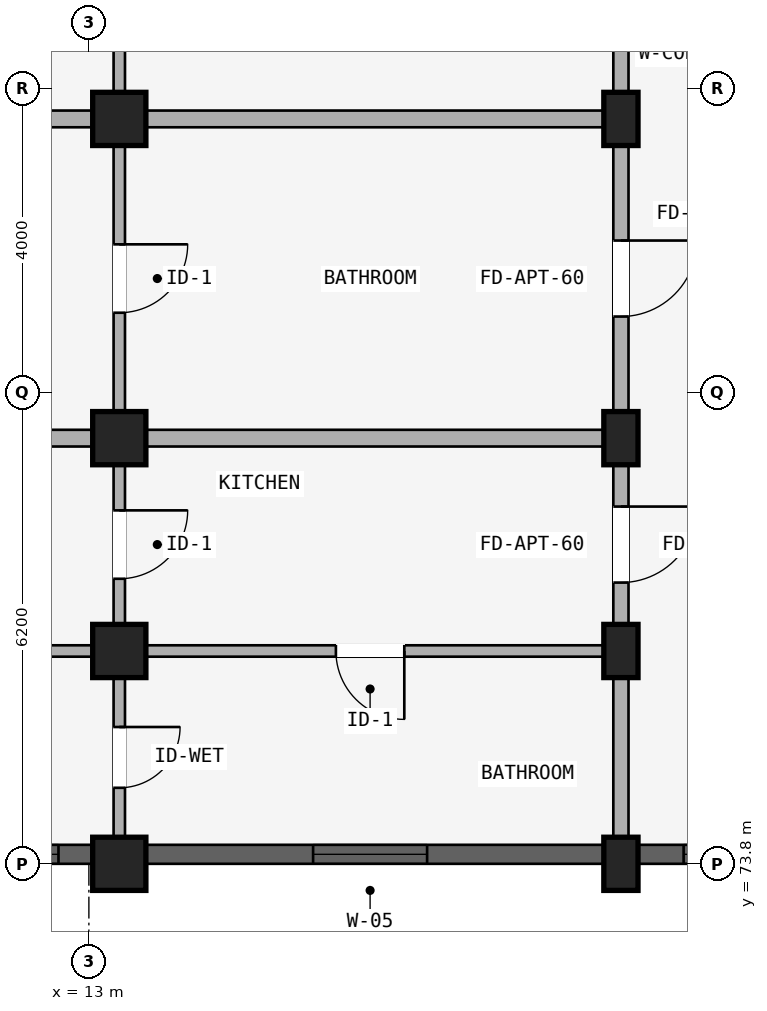
"""IFC4 building model, lengths in metres.
Left out: names, types, materials, properties, quantities, classifications, styles, units other than length and angle.
Written with IfcOpenShell. Run it as: python <this file> out.ifc"""

import sys

from ifc_helpers import new_model, si_unit, direction, frame, frame_2d, origin, origin_2d, place, context, subcontext, project, spatial, rectangle, extrude, element, fill, save


model = new_model("IFC4")
c1 = context("Model", 3, precision=1e-05, world=origin(), true_north=direction((0.0, 1.0)))
c2 = subcontext(c1, "Body", "Model", "MODEL_VIEW")
j1 = project(units=[si_unit("LENGTHUNIT", "METRE"), si_unit("PLANEANGLEUNIT", "RADIAN")], contexts=[c1])
p1 = place(None, origin())
s1 = spatial("IfcSite", under=j1, at=p1, CompositionType="ELEMENT")
p2 = place(p1, origin())
s2 = spatial("IfcBuilding", under=s1, at=p2, CompositionType="ELEMENT")
p3 = place(p2, frame((0.0, 0.0, 21.3)))
s3 = spatial("IfcBuildingStorey", under=s2, at=p3, CompositionType="ELEMENT", Elevation=21.3)
p4 = place(p3, frame((20.0, 83.6, 0.0), z_axis=(0.0, 0.0, 1.0), x_axis=(1.0, 0.0, 0.0)))
e1 = element("IfcColumn", 1, at=p4, inside=s3, PredefinedType="COLUMN", context=c2, shape_type="SweptSolid", body=[
    extrude(rectangle(XDim=0.45, YDim=0.7, at=origin_2d()), origin(), (0.0, 0.0, 1.0), 2.93),
])
p5 = place(p3, frame((13.4, 83.6, 0.0), z_axis=(0.0, 0.0, 1.0), x_axis=(1.0, 0.0, 0.0)))
e2 = element("IfcColumn", 2, at=p5, inside=s3, PredefinedType="COLUMN", context=c2, shape_type="SweptSolid", body=[
    extrude(rectangle(XDim=0.7, YDim=0.7, at=origin_2d()), origin(), (0.0, 0.0, 1.0), 2.93),
])
p6 = place(p3, frame((20.0, 79.4, 0.0), z_axis=(0.0, 0.0, 1.0), x_axis=(1.0, 0.0, 0.0)))
e3 = element("IfcColumn", 3, at=p6, inside=s3, PredefinedType="COLUMN", context=c2, shape_type="SweptSolid", body=[
    extrude(rectangle(XDim=0.45, YDim=0.7, at=origin_2d()), origin(), (0.0, 0.0, 1.0), 2.93),
])
p7 = place(p3, frame((13.4, 79.4, 0.0), z_axis=(0.0, 0.0, 1.0), x_axis=(1.0, 0.0, 0.0)))
e4 = element("IfcColumn", 4, at=p7, inside=s3, PredefinedType="COLUMN", context=c2, shape_type="SweptSolid", body=[
    extrude(rectangle(XDim=0.7, YDim=0.7, at=origin_2d()), origin(), (0.0, 0.0, 1.0), 2.93),
])
p8 = place(p3, frame((20.0, 76.6, 0.0), z_axis=(0.0, 0.0, 1.0), x_axis=(1.0, 0.0, 0.0)))
e5 = element("IfcColumn", 5, at=p8, inside=s3, PredefinedType="COLUMN", context=c2, shape_type="SweptSolid", body=[
    extrude(rectangle(XDim=0.45, YDim=0.7, at=origin_2d()), origin(), (0.0, 0.0, 1.0), 2.93),
])
p9 = place(p3, frame((13.4, 76.6, 0.0), z_axis=(0.0, 0.0, 1.0), x_axis=(1.0, 0.0, 0.0)))
e6 = element("IfcColumn", 6, at=p9, inside=s3, PredefinedType="COLUMN", context=c2, shape_type="SweptSolid", body=[
    extrude(rectangle(XDim=0.7, YDim=0.7, at=origin_2d()), origin(), (0.0, 0.0, 1.0), 2.93),
])
p10 = place(p3, frame((20.0, 73.8, 0.0), z_axis=(0.0, 0.0, 1.0), x_axis=(1.0, 0.0, 0.0)))
e7 = element("IfcColumn", 7, at=p10, inside=s3, PredefinedType="COLUMN", context=c2, shape_type="SweptSolid", body=[
    extrude(rectangle(XDim=0.45, YDim=0.7, at=origin_2d()), origin(), (0.0, 0.0, 1.0), 2.93),
])
p11 = place(p3, frame((13.4, 73.8, 0.0), z_axis=(0.0, 0.0, 1.0), x_axis=(1.0, 0.0, 0.0)))
e8 = element("IfcColumn", 8, at=p11, inside=s3, PredefinedType="COLUMN", context=c2, shape_type="SweptSolid", body=[
    extrude(rectangle(XDim=0.7, YDim=0.7, at=origin_2d()), origin(), (0.0, 0.0, 1.0), 2.93),
])
p12 = place(p3, frame((20.0, 87.65, 0.0), z_axis=(0.0, 0.0, 1.0), x_axis=(0.0, -1.0, 0.0)))
e9 = element("IfcWall", 9, at=p12, inside=s3, PredefinedType="STANDARD", context=c2, shape_type="SweptSolid", body=[
    extrude(rectangle(XDim=4.05, YDim=0.2, at=frame_2d((2.025, 0.0))), origin(), (0.0, 0.0, 1.0), 2.372),
])
p13 = place(p12, frame((1.525, 0.0, 0.0)))
e10 = element("IfcOpeningElement", 10, at=p13, cuts=e9, PredefinedType="OPENING", context=c2, shape_type="SweptSolid", body=[
    extrude(rectangle(XDim=1.0, YDim=2.15, at=frame_2d((0.5, 1.075))), frame((0.0, 0.11, 0.0), z_axis=(0.0, -1.0, 0.0), x_axis=(1.0, 0.0, 0.0)), (0.0, 0.0, 1.0), 0.22),
])
p14 = place(p3, frame((13.4, 87.57, 0.0), z_axis=(0.0, 0.0, 1.0), x_axis=(0.0, -1.0, 0.0)))
e11 = element("IfcWall", 11, at=p14, inside=s3, PredefinedType="PARTITIONING", context=c2, shape_type="SweptSolid", body=[
    extrude(rectangle(XDim=3.89, YDim=0.15, at=frame_2d((1.945, 0.0))), origin(), (0.0, 0.0, 1.0), 2.372),
])
p15 = place(p14, frame((1.495, 0.0, 0.0)))
e12 = element("IfcOpeningElement", 12, at=p15, cuts=e11, PredefinedType="OPENING", context=c2, shape_type="SweptSolid", body=[
    extrude(rectangle(XDim=0.9, YDim=2.1, at=frame_2d((0.45, 1.05))), frame((0.0, 0.085, 0.0), z_axis=(0.0, -1.0, 0.0), x_axis=(1.0, 0.0, 0.0)), (0.0, 0.0, 1.0), 0.17),
])
p16 = place(p3, frame((20.0, 83.6, 0.0), z_axis=(0.0, 0.0, 1.0), x_axis=(0.0, -1.0, 0.0)))
e13 = element("IfcWall", 13, at=p16, inside=s3, PredefinedType="STANDARD", context=c2, shape_type="SweptSolid", body=[
    extrude(rectangle(XDim=4.2, YDim=0.2, at=frame_2d((2.1, 0.0))), origin(), (0.0, 0.0, 1.0), 2.372),
])
p17 = place(p16, frame((1.6, 0.0, 0.0)))
e14 = element("IfcOpeningElement", 14, at=p17, cuts=e13, PredefinedType="OPENING", context=c2, shape_type="SweptSolid", body=[
    extrude(rectangle(XDim=1.0, YDim=2.15, at=frame_2d((0.5, 1.075))), frame((0.0, 0.11, 0.0), z_axis=(0.0, -1.0, 0.0), x_axis=(1.0, 0.0, 0.0)), (0.0, 0.0, 1.0), 0.22),
])
p18 = place(p3, frame((13.4, 83.52, 0.0), z_axis=(0.0, 0.0, 1.0), x_axis=(0.0, -1.0, 0.0)))
e15 = element("IfcWall", 15, at=p18, inside=s3, PredefinedType="PARTITIONING", context=c2, shape_type="SweptSolid", body=[
    extrude(rectangle(XDim=4.04, YDim=0.15, at=frame_2d((2.02, 0.0))), origin(), (0.0, 0.0, 1.0), 2.372),
])
p19 = place(p18, frame((1.57, 0.0, 0.0)))
e16 = element("IfcOpeningElement", 16, at=p19, cuts=e15, PredefinedType="OPENING", context=c2, shape_type="SweptSolid", body=[
    extrude(rectangle(XDim=0.9, YDim=2.1, at=frame_2d((0.45, 1.05))), frame((0.0, 0.085, 0.0), z_axis=(0.0, -1.0, 0.0), x_axis=(1.0, 0.0, 0.0)), (0.0, 0.0, 1.0), 0.17),
])
p20 = place(p3, frame((19.95, 83.6, 0.0), z_axis=(0.0, 0.0, 1.0), x_axis=(-1.0, 0.0, 0.0)))
e17 = element("IfcWall", 17, at=p20, inside=s3, PredefinedType="STANDARD", context=c2, shape_type="SweptSolid", body=[
    extrude(rectangle(XDim=17.53, YDim=0.22, at=frame_2d((8.765, 0.0))), origin(), (0.0, 0.0, 1.0), 2.372),
])
p21 = place(p3, frame((20.0, 79.4, 0.0), z_axis=(0.0, 0.0, 1.0), x_axis=(0.0, -1.0, 0.0)))
e18 = element("IfcWall", 18, at=p21, inside=s3, PredefinedType="STANDARD", context=c2, shape_type="SweptSolid", body=[
    extrude(rectangle(XDim=2.8, YDim=0.2, at=frame_2d((1.4, 0.0))), origin(), (0.0, 0.0, 1.0), 2.372),
])
p22 = place(p21, frame((0.9, 0.0, 0.0)))
e19 = element("IfcOpeningElement", 19, at=p22, cuts=e18, PredefinedType="OPENING", context=c2, shape_type="SweptSolid", body=[
    extrude(rectangle(XDim=1.0, YDim=2.15, at=frame_2d((0.5, 1.075))), frame((0.0, 0.11, 0.0), z_axis=(0.0, -1.0, 0.0), x_axis=(1.0, 0.0, 0.0)), (0.0, 0.0, 1.0), 0.22),
])
p23 = place(p3, frame((13.4, 79.32, 0.0), z_axis=(0.0, 0.0, 1.0), x_axis=(0.0, -1.0, 0.0)))
e20 = element("IfcWall", 20, at=p23, inside=s3, PredefinedType="PLUMBINGWALL", context=c2, shape_type="SweptSolid", body=[
    extrude(rectangle(XDim=2.64, YDim=0.15, at=frame_2d((1.32, 0.0))), origin(), (0.0, 0.0, 1.0), 2.372),
])
p24 = place(p23, frame((0.87, 0.0, 0.0)))
e21 = element("IfcOpeningElement", 21, at=p24, cuts=e20, PredefinedType="OPENING", context=c2, shape_type="SweptSolid", body=[
    extrude(rectangle(XDim=0.9, YDim=2.1, at=frame_2d((0.45, 1.05))), frame((0.0, 0.085, 0.0), z_axis=(0.0, -1.0, 0.0), x_axis=(1.0, 0.0, 0.0)), (0.0, 0.0, 1.0), 0.17),
])
p25 = place(p3, frame((19.9, 79.4, 0.0), z_axis=(0.0, 0.0, 1.0), x_axis=(-1.0, 0.0, 0.0)))
e22 = element("IfcWall", 22, at=p25, inside=s3, PredefinedType="STANDARD", context=c2, shape_type="SweptSolid", body=[
    extrude(rectangle(XDim=17.42, YDim=0.22, at=frame_2d((8.71, 0.0))), origin(), (0.0, 0.0, 1.0), 2.372),
])
p26 = place(p3, frame((20.0, 76.6, 0.0), z_axis=(0.0, 0.0, 1.0), x_axis=(0.0, -1.0, 0.0)))
e23 = element("IfcWall", 23, at=p26, inside=s3, PredefinedType="STANDARD", context=c2, shape_type="SweptSolid", body=[
    extrude(rectangle(XDim=2.8, YDim=0.2, at=frame_2d((1.4, 0.0))), origin(), (0.0, 0.0, 1.0), 2.372),
])
p27 = place(p3, frame((13.4, 76.52, 0.0), z_axis=(0.0, 0.0, 1.0), x_axis=(0.0, -1.0, 0.0)))
e24 = element("IfcWall", 24, at=p27, inside=s3, PredefinedType="PLUMBINGWALL", context=c2, shape_type="SweptSolid", body=[
    extrude(rectangle(XDim=2.64, YDim=0.15, at=frame_2d((1.32, 0.0))), origin(), (0.0, 0.0, 1.0), 2.372),
])
p28 = place(p27, frame((0.92, 0.0, 0.0)))
e25 = element("IfcOpeningElement", 25, at=p28, cuts=e24, PredefinedType="OPENING", context=c2, shape_type="SweptSolid", body=[
    extrude(rectangle(XDim=0.8, YDim=2.1, at=frame_2d((0.4, 1.05))), frame((0.0, 0.085, 0.0), z_axis=(0.0, -1.0, 0.0), x_axis=(1.0, 0.0, 0.0)), (0.0, 0.0, 1.0), 0.17),
])
p29 = place(p3, frame((19.9, 76.6, 0.0), z_axis=(0.0, 0.0, 1.0), x_axis=(-1.0, 0.0, 0.0)))
e26 = element("IfcWall", 26, at=p29, inside=s3, PredefinedType="PARTITIONING", context=c2, shape_type="SweptSolid", body=[
    extrude(rectangle(XDim=17.42, YDim=0.15, at=frame_2d((8.71, 0.0))), origin(), (0.0, 0.0, 1.0), 2.372),
])
p30 = place(p29, frame((2.75, 0.0, 0.0)))
e27 = element("IfcOpeningElement", 27, at=p30, cuts=e26, PredefinedType="OPENING", context=c2, shape_type="SweptSolid", body=[
    extrude(rectangle(XDim=0.9, YDim=2.1, at=frame_2d((0.45, 1.05))), frame((0.0, 0.085, 0.0), z_axis=(0.0, -1.0, 0.0), x_axis=(1.0, 0.0, 0.0)), (0.0, 0.0, 1.0), 0.17),
])
p31 = place(p3, frame((22.171, 73.925, 0.0), z_axis=(0.0, 0.0, 1.0), x_axis=(-1.0, 0.0, 0.0)))
e28 = element("IfcWall", 28, at=p31, inside=s3, PredefinedType="STANDARD", context=c2, shape_type="SweptSolid", body=[
    extrude(rectangle(XDim=1.943, YDim=0.25, at=frame_2d((0.971, 0.0))), origin(), (0.0, 0.0, 1.0), 2.372),
])
p32 = place(p31, frame((0.596, 0.0, 0.88)))
e29 = element("IfcOpeningElement", 29, at=p32, cuts=e28, PredefinedType="OPENING", context=c2, shape_type="SweptSolid", body=[
    extrude(rectangle(XDim=0.75, YDim=1.05, at=frame_2d((0.375, 0.525))), frame((0.0, 0.135, 0.0), z_axis=(0.0, -1.0, 0.0), x_axis=(1.0, 0.0, 0.0)), (0.0, 0.0, 1.0), 0.27),
])
p33 = place(p3, frame((19.771, 73.925, 0.0), z_axis=(0.0, 0.0, 1.0), x_axis=(-1.0, 0.0, 0.0)))
e30 = element("IfcWall", 30, at=p33, inside=s3, PredefinedType="STANDARD", context=c2, shape_type="SweptSolid", body=[
    extrude(rectangle(XDim=6.018, YDim=0.25, at=frame_2d((3.009, 0.0))), origin(), (0.0, 0.0, 1.0), 2.372),
])
p34 = place(p33, frame((2.322, 0.0, 0.522)))
e31 = element("IfcOpeningElement", 31, at=p34, cuts=e30, PredefinedType="OPENING", context=c2, shape_type="SweptSolid", body=[
    extrude(rectangle(XDim=1.5, YDim=1.65, at=frame_2d((0.75, 0.825))), frame((0.0, 0.135, 0.0), z_axis=(0.0, -1.0, 0.0), x_axis=(1.0, 0.0, 0.0)), (0.0, 0.0, 1.0), 0.27),
])
p35 = place(p3, frame((13.046, 73.925, 0.0), z_axis=(0.0, 0.0, 1.0), x_axis=(-1.0, 0.0, 0.0)))
e32 = element("IfcWall", 32, at=p35, inside=s3, PredefinedType="STANDARD", context=c2, shape_type="SweptSolid", body=[
    extrude(rectangle(XDim=2.093, YDim=0.25, at=frame_2d((1.046, 0.0))), origin(), (0.0, 0.0, 1.0), 2.372),
])
p36 = place(p35, frame((0.447, 0.0, 0.672)))
e33 = element("IfcOpeningElement", 33, at=p36, cuts=e32, PredefinedType="OPENING", context=c2, shape_type="SweptSolid", body=[
    extrude(rectangle(XDim=1.2, YDim=1.5, at=frame_2d((0.6, 0.75))), frame((0.0, 0.135, 0.0), z_axis=(0.0, -1.0, 0.0), x_axis=(1.0, 0.0, 0.0)), (0.0, 0.0, 1.0), 0.27),
])
p37 = place(p32, origin())
e34 = element("IfcWindow", 34, at=p37, inside=s3, PartitioningType="SINGLE_PANEL", PredefinedType="WINDOW", context=c2, shape_type="SweptSolid", body=[
    extrude(rectangle(XDim=0.75, YDim=1.05, at=frame_2d((0.375, 0.525))), frame((0.0, 0.03, 0.0), z_axis=(0.0, -1.0, 0.0), x_axis=(1.0, 0.0, 0.0)), (0.0, 0.0, 1.0), 0.06),
])
fill(e29, e34)
p38 = place(p34, origin())
e35 = element("IfcWindow", 35, at=p38, inside=s3, PartitioningType="DOUBLE_PANEL_VERTICAL", PredefinedType="WINDOW", context=c2, shape_type="SweptSolid", body=[
    extrude(rectangle(XDim=1.5, YDim=1.65, at=frame_2d((0.75, 0.825))), frame((0.0, 0.03, 0.0), z_axis=(0.0, -1.0, 0.0), x_axis=(1.0, 0.0, 0.0)), (0.0, 0.0, 1.0), 0.06),
])
fill(e31, e35)
p39 = place(p36, origin())
e36 = element("IfcWindow", 36, at=p39, inside=s3, PartitioningType="SINGLE_PANEL", PredefinedType="WINDOW", context=c2, shape_type="SweptSolid", body=[
    extrude(rectangle(XDim=1.2, YDim=1.5, at=frame_2d((0.6, 0.75))), frame((0.0, 0.03, 0.0), z_axis=(0.0, -1.0, 0.0), x_axis=(1.0, 0.0, 0.0)), (0.0, 0.0, 1.0), 0.06),
])
fill(e33, e36)
p40 = place(p17, origin())
e37 = element("IfcDoor", 37, at=p40, inside=s3, OperationType="SINGLE_SWING_LEFT", PredefinedType="DOOR", context=c2, shape_type="SweptSolid", body=[
    extrude(rectangle(XDim=1.0, YDim=2.15, at=frame_2d((0.5, 1.075))), frame((0.0, 0.025, 0.0), z_axis=(0.0, -1.0, 0.0), x_axis=(1.0, 0.0, 0.0)), (0.0, 0.0, 1.0), 0.05),
])
fill(e14, e37)
p41 = place(p19, frame((0.9, 0.0, 0.0), z_axis=(0.0, 0.0, 1.0), x_axis=(-1.0, 0.0, 0.0)))
e38 = element("IfcDoor", 38, at=p41, inside=s3, OperationType="SINGLE_SWING_RIGHT", PredefinedType="DOOR", context=c2, shape_type="SweptSolid", body=[
    extrude(rectangle(XDim=0.9, YDim=2.1, at=frame_2d((0.45, 1.05))), frame((0.0, 0.025, 0.0), z_axis=(0.0, -1.0, 0.0), x_axis=(1.0, 0.0, 0.0)), (0.0, 0.0, 1.0), 0.05),
])
fill(e16, e38)
p42 = place(p24, frame((0.9, 0.0, 0.0), z_axis=(0.0, 0.0, 1.0), x_axis=(-1.0, 0.0, 0.0)))
e39 = element("IfcDoor", 39, at=p42, inside=s3, OperationType="SINGLE_SWING_RIGHT", PredefinedType="DOOR", context=c2, shape_type="SweptSolid", body=[
    extrude(rectangle(XDim=0.9, YDim=2.1, at=frame_2d((0.45, 1.05))), frame((0.0, 0.025, 0.0), z_axis=(0.0, -1.0, 0.0), x_axis=(1.0, 0.0, 0.0)), (0.0, 0.0, 1.0), 0.05),
])
fill(e21, e39)
p43 = place(p22, origin())
e40 = element("IfcDoor", 40, at=p43, inside=s3, OperationType="SINGLE_SWING_LEFT", PredefinedType="DOOR", context=c2, shape_type="SweptSolid", body=[
    extrude(rectangle(XDim=1.0, YDim=2.15, at=frame_2d((0.5, 1.075))), frame((0.0, 0.025, 0.0), z_axis=(0.0, -1.0, 0.0), x_axis=(1.0, 0.0, 0.0)), (0.0, 0.0, 1.0), 0.05),
])
fill(e19, e40)
p44 = place(p28, frame((0.8, 0.0, 0.0), z_axis=(0.0, 0.0, 1.0), x_axis=(-1.0, 0.0, 0.0)))
e41 = element("IfcDoor", 41, at=p44, inside=s3, OperationType="SINGLE_SWING_RIGHT", PredefinedType="DOOR", context=c2, shape_type="SweptSolid", body=[
    extrude(rectangle(XDim=0.8, YDim=2.1, at=frame_2d((0.4, 1.05))), frame((0.0, 0.025, 0.0), z_axis=(0.0, -1.0, 0.0), x_axis=(1.0, 0.0, 0.0)), (0.0, 0.0, 1.0), 0.05),
])
fill(e25, e41)
p45 = place(p30, frame((0.9, 0.0, 0.0), z_axis=(0.0, 0.0, 1.0), x_axis=(-1.0, 0.0, 0.0)))
e42 = element("IfcDoor", 42, at=p45, inside=s3, OperationType="SINGLE_SWING_RIGHT", PredefinedType="DOOR", context=c2, shape_type="SweptSolid", body=[
    extrude(rectangle(XDim=0.9, YDim=2.1, at=frame_2d((0.45, 1.05))), frame((0.0, 0.025, 0.0), z_axis=(0.0, -1.0, 0.0), x_axis=(1.0, 0.0, 0.0)), (0.0, 0.0, 1.0), 0.05),
])
fill(e27, e42)
save(model, sys.argv[1])
